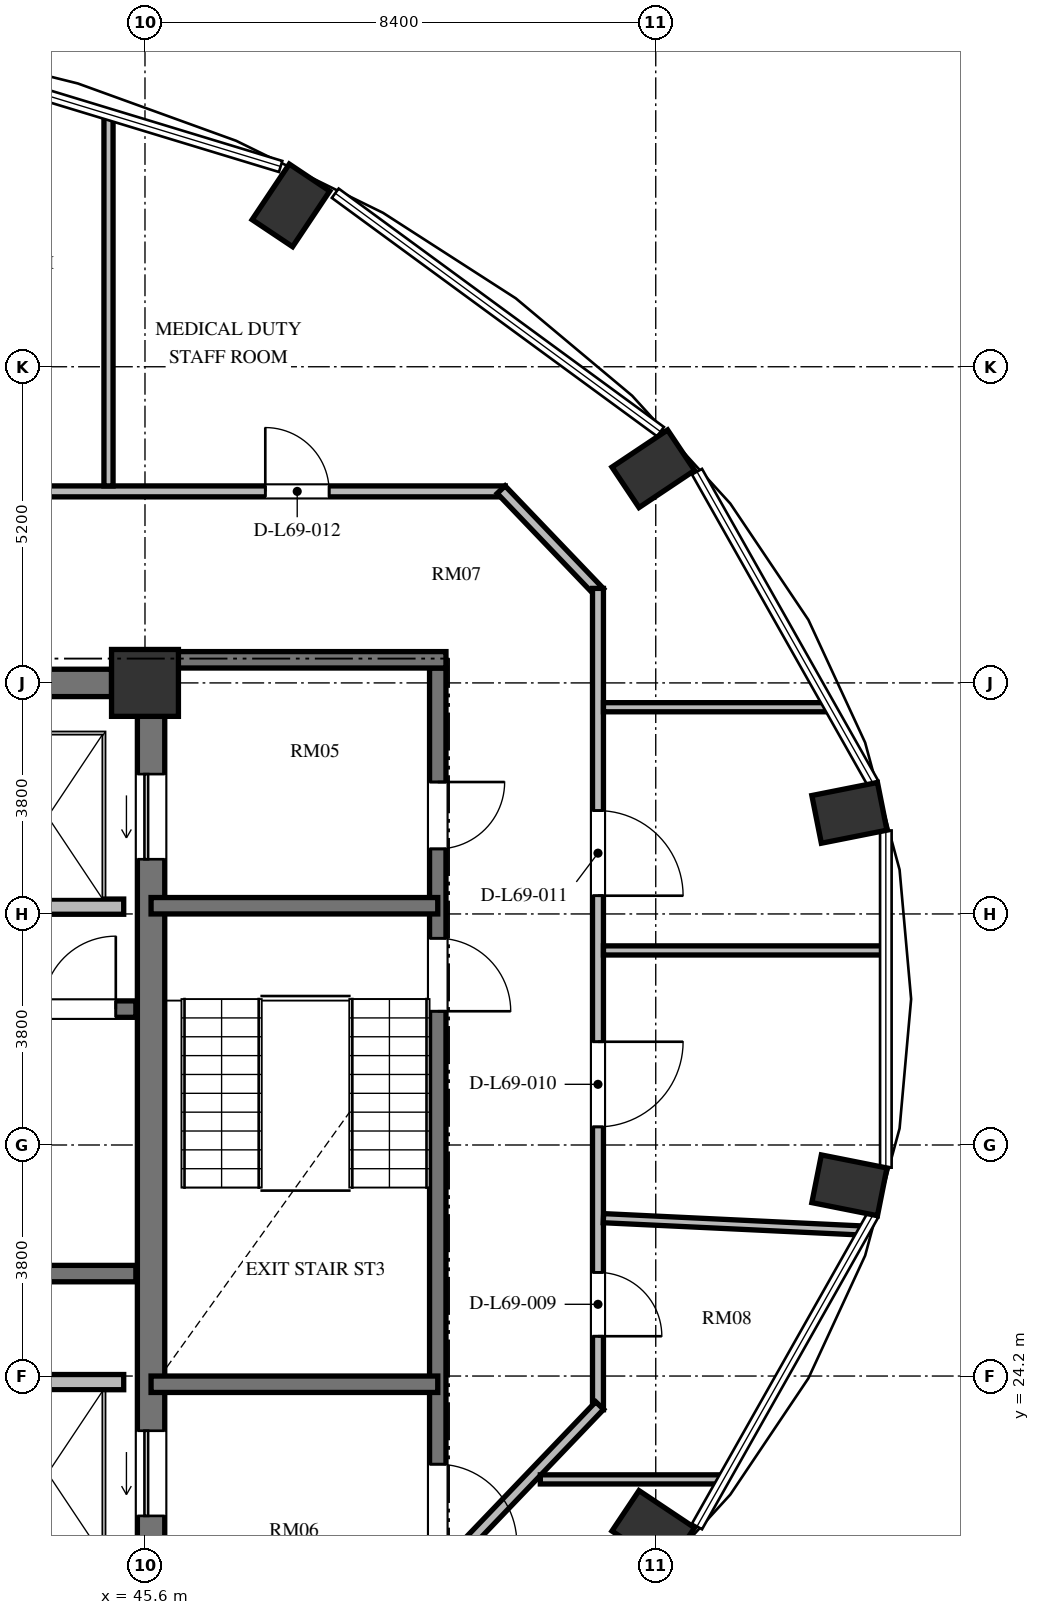
"""IFC4 building model, lengths in metres.
Left out: names, types, materials, properties, quantities, classifications, styles, units other than length and angle.
Written with IfcOpenShell. Run it as: python <this file> out.ifc"""

import sys

from ifc_helpers import new_model, si_unit, direction, frame, frame_2d, origin, origin_2d, place, context, subcontext, project, spatial, rectangle, extrude, element, fill, save


model = new_model("IFC4")
c1 = context("Model", 3, precision=1e-05, world=origin(), true_north=direction((0.0, 1.0)))
c2 = subcontext(c1, "Body", "Model", "MODEL_VIEW")
j1 = project(units=[si_unit("LENGTHUNIT", "METRE"), si_unit("PLANEANGLEUNIT", "RADIAN")], contexts=[c1])
p1 = place(None, origin())
s1 = spatial("IfcSite", under=j1, at=p1, CompositionType="ELEMENT")
p2 = place(p1, origin())
s2 = spatial("IfcBuilding", under=s1, at=p2, CompositionType="ELEMENT")
p3 = place(p2, frame((0.0, 0.0, 265.968)))
s3 = spatial("IfcBuildingStorey", under=s2, at=p3, CompositionType="ELEMENT", Elevation=265.968)
for number, where, z_axis, x_axis in (
    (1, (53.96, 21.677, 0.0), (0.0, 0.0, 1.0), (0.831, -0.556, 0.0)),
    (2, (57.185, 27.337, 0.0), (0.0, 0.0, 1.0), (0.981, -0.195, 0.0)),
    (3, (57.185, 33.463, 0.0), (0.0, 0.0, 1.0), (0.981, 0.195, 0.0)),
    (4, (53.96, 39.123, 0.0), (0.0, 0.0, 1.0), (0.831, 0.556, 0.0)),
    (5, (48.0, 43.454, 0.0), (0.0, 0.0, 1.0), (0.556, 0.831, 0.0)),
):
    element("IfcColumn", number, at=place(p3, frame(where, z_axis=z_axis, x_axis=x_axis)), inside=s3, PredefinedType="COLUMN", context=c2, shape_type="SweptSolid", body=[
        extrude(rectangle(XDim=1.1, YDim=0.8, at=origin_2d()), origin(), (0.0, 0.0, 1.0), 3.648),
    ])
p4 = place(p3, frame((45.6, 35.6, 0.0), z_axis=(0.0, 0.0, 1.0), x_axis=(1.0, 0.0, 0.0)))
e6 = element("IfcColumn", 6, at=p4, inside=s3, PredefinedType="COLUMN", context=c2, shape_type="SweptSolid", body=[
    extrude(rectangle(XDim=1.1, YDim=1.1, at=origin_2d()), origin(), (0.0, 0.0, 1.0), 3.648),
])
p5 = place(p3, frame((45.7, 20.95, 0.0), z_axis=(0.0, 0.0, 1.0), x_axis=(0.0, 1.0, 0.0)))
e7 = element("IfcWall", 7, at=p5, inside=s3, PredefinedType="SHEAR", context=c2, shape_type="SweptSolid", body=[
    extrude(rectangle(XDim=14.1, YDim=0.45, at=frame_2d((7.05, 0.0))), origin(), (0.0, 0.0, 1.0), 3.648),
])
p6 = place(p5, frame((11.75, 0.0, 0.0)))
e8 = element("IfcOpeningElement", 8, at=p6, cuts=e7, PredefinedType="OPENING", context=c2, shape_type="SweptSolid", body=[
    extrude(rectangle(XDim=1.4, YDim=2.3, at=frame_2d((0.7, 1.15))), frame((0.0, 0.235, 0.0), z_axis=(0.0, -1.0, 0.0), x_axis=(1.0, 0.0, 0.0)), (0.0, 0.0, 1.0), 0.47),
])
p7 = place(p5, frame((0.95, 0.0, 0.0)))
e9 = element("IfcOpeningElement", 9, at=p7, cuts=e7, PredefinedType="OPENING", context=c2, shape_type="SweptSolid", body=[
    extrude(rectangle(XDim=1.4, YDim=2.3, at=frame_2d((0.7, 1.15))), frame((0.0, 0.235, 0.0), z_axis=(0.0, -1.0, 0.0), x_axis=(1.0, 0.0, 0.0)), (0.0, 0.0, 1.0), 0.47),
])
p8 = place(p3, frame((39.6, 35.6, 0.0), z_axis=(0.0, 0.0, 1.0), x_axis=(1.0, 0.0, 0.0)))
e10 = element("IfcWall", 10, at=p8, inside=s3, PredefinedType="SHEAR", context=c2, shape_type="SweptSolid", body=[
    extrude(rectangle(XDim=5.45, YDim=0.45, at=frame_2d((2.725, 0.0))), origin(), (0.0, 0.0, 1.0), 3.648),
])
p9 = place(p3, frame((37.465, 30.235, 0.0), z_axis=(0.0, 0.0, 1.0), x_axis=(1.0, 0.0, 0.0)))
e11 = element("IfcWall", 11, at=p9, inside=s3, PredefinedType="SHEAR", context=c2, shape_type="SweptSolid", body=[
    extrude(rectangle(XDim=7.985, YDim=0.27, at=frame_2d((3.992, 0.0))), origin(), (0.0, 0.0, 1.0), 3.648),
])
p10 = place(p9, frame((6.455, 0.0, 0.0)))
e12 = element("IfcOpeningElement", 12, at=p10, cuts=e11, PredefinedType="OPENING", context=c2, shape_type="SweptSolid", body=[
    extrude(rectangle(XDim=1.2, YDim=2.15, at=frame_2d((0.6, 1.075))), frame((0.0, 0.145, 0.0), z_axis=(0.0, -1.0, 0.0), x_axis=(1.0, 0.0, 0.0)), (0.0, 0.0, 1.0), 0.29),
])
p11 = place(p3, frame((37.465, 25.885, 0.0), z_axis=(0.0, 0.0, 1.0), x_axis=(1.0, 0.0, 0.0)))
e13 = element("IfcWall", 13, at=p11, inside=s3, PredefinedType="SHEAR", context=c2, shape_type="SweptSolid", body=[
    extrude(rectangle(XDim=7.985, YDim=0.27, at=frame_2d((3.992, 0.0))), origin(), (0.0, 0.0, 1.0), 3.648),
])
for number, where, z_axis, x_axis in (
    (14, (42.95, 31.92, 0.0), (0.0, 0.0, 1.0), (1.0, 0.0, 0.0)),
    (15, (42.95, 24.1, 0.0), (0.0, 0.0, 1.0), (1.0, 0.0, 0.0)),
):
    element("IfcWall", number, at=place(p3, frame(where, z_axis=z_axis, x_axis=x_axis)), inside=s3, PredefinedType="SOLIDWALL", context=c2, shape_type="SweptSolid", body=[
        extrude(rectangle(XDim=2.3, YDim=0.25, at=frame_2d((1.15, 0.0))), origin(), (0.0, 0.0, 1.0), 3.198),
    ])
p12 = place(p3, frame((50.415, 35.845, 0.0), z_axis=(0.0, 0.0, 1.0), x_axis=(0.0, -1.0, 0.0)))
e16 = element("IfcWall", 16, at=p12, inside=s3, PredefinedType="SHEAR", context=c2, shape_type="SweptSolid", body=[
    extrude(rectangle(XDim=15.825, YDim=0.27, at=frame_2d((7.913, 0.0))), origin(), (0.0, 0.0, 1.0), 3.648),
])
p13 = place(p12, frame((4.445, 0.0, 0.0)))
e17 = element("IfcOpeningElement", 17, at=p13, cuts=e16, PredefinedType="OPENING", context=c2, shape_type="SweptSolid", body=[
    extrude(rectangle(XDim=1.2, YDim=2.15, at=frame_2d((0.6, 1.075))), frame((0.0, 0.145, 0.0), z_axis=(0.0, -1.0, 0.0), x_axis=(1.0, 0.0, 0.0)), (0.0, 0.0, 1.0), 0.29),
])
p14 = place(p12, frame((1.875, 0.0, 0.0)))
e18 = element("IfcOpeningElement", 18, at=p14, cuts=e16, PredefinedType="OPENING", context=c2, shape_type="SweptSolid", body=[
    extrude(rectangle(XDim=1.1, YDim=2.12, at=frame_2d((0.55, 1.06))), frame((0.0, 0.145, 0.0), z_axis=(0.0, -1.0, 0.0), x_axis=(1.0, 0.0, 0.0)), (0.0, 0.0, 1.0), 0.29),
])
p15 = place(p12, frame((13.095, 0.0, 0.0)))
e19 = element("IfcOpeningElement", 19, at=p15, cuts=e16, PredefinedType="OPENING", context=c2, shape_type="SweptSolid", body=[
    extrude(rectangle(XDim=1.3, YDim=2.2, at=frame_2d((0.65, 1.1))), frame((0.0, 0.145, 0.0), z_axis=(0.0, -1.0, 0.0), x_axis=(1.0, 0.0, 0.0)), (0.0, 0.0, 1.0), 0.29),
])
p16 = place(p3, frame((45.925, 35.98, 0.0), z_axis=(0.0, 0.0, 1.0), x_axis=(1.0, 0.0, 0.0)))
e20 = element("IfcWall", 20, at=p16, inside=s3, PredefinedType="SHEAR", context=c2, shape_type="SweptSolid", body=[
    extrude(rectangle(XDim=4.625, YDim=0.27, at=frame_2d((2.312, 0.0))), origin(), (0.0, 0.0, 1.0), 3.648),
])
for number, where, z_axis, x_axis in (
    (21, (45.7, 31.935, 0.0), (0.0, 0.0, 1.0), (1.0, 0.0, 0.0)),
    (22, (45.7, 24.065, 0.0), (0.0, 0.0, 1.0), (1.0, 0.0, 0.0)),
):
    element("IfcWall", number, at=place(p3, frame(where, z_axis=z_axis, x_axis=x_axis)), inside=s3, PredefinedType="SHEAR", context=c2, shape_type="SweptSolid", body=[
        extrude(rectangle(XDim=4.715, YDim=0.27, at=frame_2d((2.357, 0.0))), origin(), (0.0, 0.0, 1.0), 3.648),
    ])
p17 = place(p3, frame((30.71, 38.75, 0.0), z_axis=(0.0, 0.0, 1.0), x_axis=(1.0, 0.0, 0.0)))
e23 = element("IfcWall", 23, at=p17, inside=s3, PredefinedType="PARTITIONING", context=c2, shape_type="SweptSolid", body=[
    extrude(rectangle(XDim=20.815, YDim=0.18, at=frame_2d((10.408, 0.0))), origin(), (0.0, 0.0, 1.0), 2.823),
])
p18 = place(p17, frame((16.869, 0.0, 0.0)))
e24 = element("IfcOpeningElement", 24, at=p18, cuts=e23, PredefinedType="OPENING", context=c2, shape_type="SweptSolid", body=[
    extrude(rectangle(XDim=1.05, YDim=2.15, at=frame_2d((0.525, 1.075))), frame((0.0, 0.1, 0.0), z_axis=(0.0, -1.0, 0.0), x_axis=(1.0, 0.0, 0.0)), (0.0, 0.0, 1.0), 0.2),
])
p19 = place(p17, frame((9.965, 0.0, 0.0)))
e25 = element("IfcOpeningElement", 25, at=p19, cuts=e23, PredefinedType="OPENING", context=c2, shape_type="SweptSolid", body=[
    extrude(rectangle(XDim=1.05, YDim=2.15, at=frame_2d((0.525, 1.075))), frame((0.0, 0.1, 0.0), z_axis=(0.0, -1.0, 0.0), x_axis=(1.0, 0.0, 0.0)), (0.0, 0.0, 1.0), 0.2),
])
p20 = place(p3, frame((51.458, 38.779, 0.0), z_axis=(0.0, 0.0, 1.0), x_axis=(0.691359830363, -0.722510612352, 0.0)))
e26 = element("IfcWall", 26, at=p20, inside=s3, PredefinedType="PARTITIONING", context=c2, shape_type="SweptSolid", body=[
    extrude(rectangle(XDim=2.343, YDim=0.18, at=frame_2d((1.172, 0.0))), origin(), (0.0, 0.0, 1.0), 2.783),
])
p21 = place(p3, frame((53.05, 37.155, 0.0), z_axis=(0.0, 0.0, 1.0), x_axis=(0.0, -1.0, 0.0)))
e27 = element("IfcWall", 27, at=p21, inside=s3, PredefinedType="PARTITIONING", context=c2, shape_type="SweptSolid", body=[
    extrude(rectangle(XDim=13.509, YDim=0.18, at=frame_2d((6.754, 0.0))), origin(), (0.0, 0.0, 1.0), 3.198),
])
p22 = place(p21, frame((11.25, 0.0, 0.0)))
e28 = element("IfcOpeningElement", 28, at=p22, cuts=e27, PredefinedType="OPENING", context=c2, shape_type="SweptSolid", body=[
    extrude(rectangle(XDim=1.05, YDim=2.15, at=frame_2d((0.525, 1.075))), frame((0.0, 0.1, 0.0), z_axis=(0.0, -1.0, 0.0), x_axis=(1.0, 0.0, 0.0)), (0.0, 0.0, 1.0), 0.2),
])
p23 = place(p21, frame((7.457, 0.0, 0.0)))
e29 = element("IfcOpeningElement", 29, at=p23, cuts=e27, PredefinedType="OPENING", context=c2, shape_type="SweptSolid", body=[
    extrude(rectangle(XDim=1.4, YDim=2.2, at=frame_2d((0.7, 1.1))), frame((0.0, 0.1, 0.0), z_axis=(0.0, -1.0, 0.0), x_axis=(1.0, 0.0, 0.0)), (0.0, 0.0, 1.0), 0.2),
])
p24 = place(p21, frame((3.655, 0.0, 0.0)))
e30 = element("IfcOpeningElement", 30, at=p24, cuts=e27, PredefinedType="OPENING", context=c2, shape_type="SweptSolid", body=[
    extrude(rectangle(XDim=1.4, YDim=2.2, at=frame_2d((0.7, 1.1))), frame((0.0, 0.1, 0.0), z_axis=(0.0, -1.0, 0.0), x_axis=(1.0, 0.0, 0.0)), (0.0, 0.0, 1.0), 0.2),
])
p25 = place(p3, frame((53.078, 23.714, 0.0), z_axis=(0.0, 0.0, 1.0), x_axis=(-0.691353379446, -0.722516785085, 0.0)))
e31 = element("IfcWall", 31, at=p25, inside=s3, PredefinedType="PARTITIONING", context=c2, shape_type="SweptSolid", body=[
    extrude(rectangle(XDim=3.604, YDim=0.18, at=frame_2d((1.802, 0.0))), origin(), (0.0, 0.0, 1.0), 3.198),
])
p26 = place(p3, frame((52.102, 22.5, 0.0), z_axis=(0.0, 0.0, 1.0), x_axis=(1.0, 0.0, 0.0)))
e32 = element("IfcWall", 32, at=p26, inside=s3, PredefinedType="PARTITIONING", context=c2, shape_type="SweptSolid", body=[
    extrude(rectangle(XDim=3.003, YDim=0.15, at=frame_2d((1.501, 0.0))), origin(), (0.0, 0.0, 1.0), 3.198),
])
p27 = place(p3, frame((53.14, 26.796, 0.0), z_axis=(0.0, 0.0, 1.0), x_axis=(0.998865822675, -0.04761374058, 0.0)))
e33 = element("IfcWall", 33, at=p27, inside=s3, PredefinedType="PARTITIONING", context=c2, shape_type="SweptSolid", body=[
    extrude(rectangle(XDim=4.297, YDim=0.15, at=frame_2d((2.148, 0.0))), origin(), (0.0, 0.0, 1.0), 3.198),
])
p28 = place(p3, frame((53.14, 31.2, 0.0), z_axis=(0.0, 0.0, 1.0), x_axis=(1.0, 0.0, 0.0)))
e34 = element("IfcWall", 34, at=p28, inside=s3, PredefinedType="PARTITIONING", context=c2, shape_type="SweptSolid", body=[
    extrude(rectangle(XDim=4.632, YDim=0.15, at=frame_2d((2.316, 0.0))), origin(), (0.0, 0.0, 1.0), 3.198),
])
p29 = place(p3, frame((53.14, 35.2, 0.0), z_axis=(0.0, 0.0, 1.0), x_axis=(1.0, 0.0, 0.0)))
e35 = element("IfcWall", 35, at=p29, inside=s3, PredefinedType="PARTITIONING", context=c2, shape_type="SweptSolid", body=[
    extrude(rectangle(XDim=3.717, YDim=0.15, at=frame_2d((1.858, 0.0))), origin(), (0.0, 0.0, 1.0), 3.198),
])
p30 = place(p3, frame((45.0, 38.84, 0.0), z_axis=(0.0, 0.0, 1.0), x_axis=(0.0, 1.0, 0.0)))
e36 = element("IfcWall", 36, at=p30, inside=s3, PredefinedType="PARTITIONING", context=c2, shape_type="SweptSolid", body=[
    extrude(rectangle(XDim=6.097, YDim=0.15, at=frame_2d((3.048, 0.0))), origin(), (0.0, 0.0, 1.0), 3.198),
])
p31 = place(p10, origin())
e37 = element("IfcDoor", 37, at=p31, inside=s3, OperationType="SINGLE_SWING_RIGHT", PredefinedType="DOOR", context=c2, shape_type="SweptSolid", body=[
    extrude(rectangle(XDim=1.2, YDim=2.15, at=frame_2d((0.6, 1.075))), frame((0.0, 0.025, 0.0), z_axis=(0.0, -1.0, 0.0), x_axis=(1.0, 0.0, 0.0)), (0.0, 0.0, 1.0), 0.05),
])
fill(e12, e37)
p32 = place(p6, origin())
e38 = element("IfcDoor", 38, at=p32, inside=s3, OperationType="SLIDING_TO_LEFT", PredefinedType="DOOR", context=c2, shape_type="SweptSolid", body=[
    extrude(rectangle(XDim=1.4, YDim=2.3, at=frame_2d((0.7, 1.15))), frame((0.0, 0.025, 0.0), z_axis=(0.0, -1.0, 0.0), x_axis=(1.0, 0.0, 0.0)), (0.0, 0.0, 1.0), 0.05),
])
fill(e8, e38)
p33 = place(p7, origin())
e39 = element("IfcDoor", 39, at=p33, inside=s3, OperationType="SLIDING_TO_LEFT", PredefinedType="DOOR", context=c2, shape_type="SweptSolid", body=[
    extrude(rectangle(XDim=1.4, YDim=2.3, at=frame_2d((0.7, 1.15))), frame((0.0, 0.025, 0.0), z_axis=(0.0, -1.0, 0.0), x_axis=(1.0, 0.0, 0.0)), (0.0, 0.0, 1.0), 0.05),
])
fill(e9, e39)
p34 = place(p13, origin())
e40 = element("IfcDoor", 40, at=p34, inside=s3, OperationType="SINGLE_SWING_RIGHT", PredefinedType="DOOR", context=c2, shape_type="SweptSolid", body=[
    extrude(rectangle(XDim=1.2, YDim=2.15, at=frame_2d((0.6, 1.075))), frame((0.0, 0.025, 0.0), z_axis=(0.0, -1.0, 0.0), x_axis=(1.0, 0.0, 0.0)), (0.0, 0.0, 1.0), 0.05),
])
fill(e17, e40)
p35 = place(p14, origin())
e41 = element("IfcDoor", 41, at=p35, inside=s3, OperationType="SINGLE_SWING_LEFT", PredefinedType="DOOR", context=c2, shape_type="SweptSolid", body=[
    extrude(rectangle(XDim=1.1, YDim=2.12, at=frame_2d((0.55, 1.06))), frame((0.0, 0.025, 0.0), z_axis=(0.0, -1.0, 0.0), x_axis=(1.0, 0.0, 0.0)), (0.0, 0.0, 1.0), 0.05),
])
fill(e18, e41)
p36 = place(p15, origin())
e42 = element("IfcDoor", 42, at=p36, inside=s3, OperationType="SINGLE_SWING_RIGHT", PredefinedType="DOOR", context=c2, shape_type="SweptSolid", body=[
    extrude(rectangle(XDim=1.3, YDim=2.2, at=frame_2d((0.65, 1.1))), frame((0.0, 0.025, 0.0), z_axis=(0.0, -1.0, 0.0), x_axis=(1.0, 0.0, 0.0)), (0.0, 0.0, 1.0), 0.05),
])
fill(e19, e42)
p37 = place(p22, origin())
e43 = element("IfcDoor", 43, at=p37, inside=s3, OperationType="SINGLE_SWING_RIGHT", PredefinedType="DOOR", context=c2, shape_type="SweptSolid", body=[
    extrude(rectangle(XDim=1.05, YDim=2.15, at=frame_2d((0.525, 1.075))), frame((0.0, 0.025, 0.0), z_axis=(0.0, -1.0, 0.0), x_axis=(1.0, 0.0, 0.0)), (0.0, 0.0, 1.0), 0.05),
])
fill(e28, e43)
p38 = place(p23, origin())
e44 = element("IfcDoor", 44, at=p38, inside=s3, OperationType="SINGLE_SWING_LEFT", PredefinedType="DOOR", context=c2, shape_type="SweptSolid", body=[
    extrude(rectangle(XDim=1.4, YDim=2.2, at=frame_2d((0.7, 1.1))), frame((0.0, 0.025, 0.0), z_axis=(0.0, -1.0, 0.0), x_axis=(1.0, 0.0, 0.0)), (0.0, 0.0, 1.0), 0.05),
])
fill(e29, e44)
p39 = place(p24, origin())
e45 = element("IfcDoor", 45, at=p39, inside=s3, OperationType="SINGLE_SWING_RIGHT", PredefinedType="DOOR", context=c2, shape_type="SweptSolid", body=[
    extrude(rectangle(XDim=1.4, YDim=2.2, at=frame_2d((0.7, 1.1))), frame((0.0, 0.025, 0.0), z_axis=(0.0, -1.0, 0.0), x_axis=(1.0, 0.0, 0.0)), (0.0, 0.0, 1.0), 0.05),
])
fill(e30, e45)
p40 = place(p18, origin())
e46 = element("IfcDoor", 46, at=p40, inside=s3, OperationType="SINGLE_SWING_LEFT", PredefinedType="DOOR", context=c2, shape_type="SweptSolid", body=[
    extrude(rectangle(XDim=1.05, YDim=2.15, at=frame_2d((0.525, 1.075))), frame((0.0, 0.025, 0.0), z_axis=(0.0, -1.0, 0.0), x_axis=(1.0, 0.0, 0.0)), (0.0, 0.0, 1.0), 0.05),
])
fill(e24, e46)
save(model, sys.argv[1])
